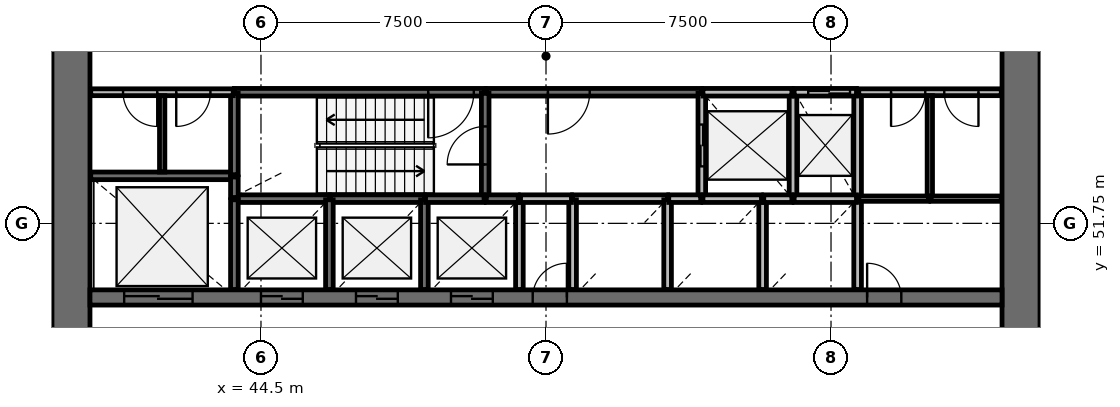
"""IFC4 building model, lengths in metres.
Left out: names, types, materials, properties, quantities, classifications, styles, units other than length and angle.
Written with IfcOpenShell. Run it as: python <this file> out.ifc"""

import sys

from ifc_helpers import new_model, si_unit, direction, frame, frame_2d, origin, place, context, subcontext, project, spatial, rectangle, extrude, source, transform, mapped, element, fill, save


model = new_model("IFC4")
c1 = context("Model", 3, precision=1e-05, world=origin(), true_north=direction((0.0, 1.0)))
c2 = subcontext(c1, "Body", "Model", "MODEL_VIEW")
j1 = project(units=[si_unit("LENGTHUNIT", "METRE"), si_unit("PLANEANGLEUNIT", "RADIAN")], contexts=[c1])
p1 = place(None, origin())
s1 = spatial("IfcSite", under=j1, at=p1, CompositionType="ELEMENT")
p2 = place(p1, origin())
s2 = spatial("IfcBuilding", under=s1, at=p2, CompositionType="ELEMENT")
p3 = place(p2, frame((0.0, 0.0, 49.0)))
s3 = spatial("IfcBuildingStorey", under=s2, at=p3, CompositionType="ELEMENT", Elevation=49.0)
p4 = place(p3, frame((64.5, 38.0, 0.0), z_axis=(0.0, 0.0, 1.0), x_axis=(0.0, 1.0, 0.0)))
e1 = element("IfcWall", 1, at=p4, inside=s3, PredefinedType="SHEAR", context=c2, shape_type="SweptSolid", body=[
    extrude(rectangle(XDim=20.0, YDim=1.0, at=frame_2d((10.0, 0.0))), origin(), (0.0, 0.0, 1.0), 4.4),
])
p5 = place(p4, frame((9.1, 0.0, 0.0)))
e2 = element("IfcOpeningElement", 2, at=p5, cuts=e1, PredefinedType="OPENING", context=c2, shape_type="SweptSolid", body=[
    extrude(rectangle(XDim=1.8, YDim=2.1, at=frame_2d((0.9, 1.05))), frame((0.0, 0.51, 0.0), z_axis=(0.0, -1.0, 0.0), x_axis=(1.0, 0.0, 0.0)), (0.0, 0.0, 1.0), 1.02),
])
p6 = place(p3, frame((39.5, 58.0, 0.0), z_axis=(0.0, 0.0, 1.0), x_axis=(0.0, -1.0, 0.0)))
e3 = element("IfcWall", 3, at=p6, inside=s3, PredefinedType="SHEAR", context=c2, shape_type="SweptSolid", body=[
    extrude(rectangle(XDim=20.0, YDim=1.0, at=frame_2d((10.0, 0.0))), origin(), (0.0, 0.0, 1.0), 4.4),
])
p7 = place(p6, frame((9.1, 0.0, 0.0)))
e4 = element("IfcOpeningElement", 4, at=p7, cuts=e3, PredefinedType="OPENING", context=c2, shape_type="SweptSolid", body=[
    extrude(rectangle(XDim=1.8, YDim=2.1, at=frame_2d((0.9, 1.05))), frame((0.0, 0.51, 0.0), z_axis=(0.0, -1.0, 0.0), x_axis=(1.0, 0.0, 0.0)), (0.0, 0.0, 1.0), 1.02),
])
p8 = place(p3, frame((40.0, 49.8, 0.0), z_axis=(0.0, 0.0, 1.0), x_axis=(1.0, 0.0, 0.0)))
e5 = element("IfcWall", 5, at=p8, inside=s3, PredefinedType="SHEAR", context=c2, shape_type="SweptSolid", body=[
    extrude(rectangle(XDim=24.0, YDim=0.4, at=frame_2d((12.0, 0.0))), origin(), (0.0, 0.0, 1.0), 4.4),
])
p9 = place(p8, frame((4.5, 0.0, 0.0)))
e6 = element("IfcOpeningElement", 6, at=p9, cuts=e5, PredefinedType="OPENING", context=c2, shape_type="SweptSolid", body=[
    extrude(rectangle(XDim=1.1, YDim=2.1, at=frame_2d((0.55, 1.05))), frame((0.0, 0.21, 0.0), z_axis=(0.0, -1.0, 0.0), x_axis=(1.0, 0.0, 0.0)), (0.0, 0.0, 1.0), 0.42),
])
p10 = place(p8, frame((7.0, 0.0, 0.0)))
e7 = element("IfcOpeningElement", 7, at=p10, cuts=e5, PredefinedType="OPENING", context=c2, shape_type="SweptSolid", body=[
    extrude(rectangle(XDim=1.1, YDim=2.1, at=frame_2d((0.55, 1.05))), frame((0.0, 0.21, 0.0), z_axis=(0.0, -1.0, 0.0), x_axis=(1.0, 0.0, 0.0)), (0.0, 0.0, 1.0), 0.42),
])
p11 = place(p8, frame((9.5, 0.0, 0.0)))
e8 = element("IfcOpeningElement", 8, at=p11, cuts=e5, PredefinedType="OPENING", context=c2, shape_type="SweptSolid", body=[
    extrude(rectangle(XDim=1.1, YDim=2.1, at=frame_2d((0.55, 1.05))), frame((0.0, 0.21, 0.0), z_axis=(0.0, -1.0, 0.0), x_axis=(1.0, 0.0, 0.0)), (0.0, 0.0, 1.0), 0.42),
])
p12 = place(p8, frame((0.9, 0.0, 0.0)))
e9 = element("IfcOpeningElement", 9, at=p12, cuts=e5, PredefinedType="OPENING", context=c2, shape_type="SweptSolid", body=[
    extrude(rectangle(XDim=1.8, YDim=2.4, at=frame_2d((0.9, 1.2))), frame((0.0, 0.21, 0.0), z_axis=(0.0, -1.0, 0.0), x_axis=(1.0, 0.0, 0.0)), (0.0, 0.0, 1.0), 0.42),
])
p13 = place(p8, frame((20.45, 0.0, 0.0)))
e10 = element("IfcOpeningElement", 10, at=p13, cuts=e5, PredefinedType="OPENING", context=c2, shape_type="SweptSolid", body=[
    extrude(rectangle(XDim=0.9, YDim=2.1, at=frame_2d((0.45, 1.05))), frame((0.0, 0.21, 0.0), z_axis=(0.0, -1.0, 0.0), x_axis=(1.0, 0.0, 0.0)), (0.0, 0.0, 1.0), 0.42),
])
p14 = place(p8, frame((11.65, 0.0, 0.0)))
e11 = element("IfcOpeningElement", 11, at=p14, cuts=e5, PredefinedType="OPENING", context=c2, shape_type="SweptSolid", body=[
    extrude(rectangle(XDim=0.9, YDim=2.1, at=frame_2d((0.45, 1.05))), frame((0.0, 0.21, 0.0), z_axis=(0.0, -1.0, 0.0), x_axis=(1.0, 0.0, 0.0)), (0.0, 0.0, 1.0), 0.42),
])
p15 = place(p3, frame((50.4, 55.2, 0.0), z_axis=(0.0, 0.0, 1.0), x_axis=(-1.0, 0.0, 0.0)))
e12 = element("IfcWall", 12, at=p15, inside=s3, PredefinedType="SOLIDWALL", context=c2, shape_type="SweptSolid", body=[
    extrude(rectangle(XDim=6.6, YDim=0.2, at=frame_2d((3.3, 0.0))), origin(), (0.0, 0.0, 1.0), 3.95),
])
p16 = place(p15, frame((0.3, 0.0, 0.0)))
e13 = element("IfcOpeningElement", 13, at=p16, cuts=e12, PredefinedType="OPENING", context=c2, shape_type="SweptSolid", body=[
    extrude(rectangle(XDim=1.2, YDim=2.1, at=frame_2d((0.6, 1.05))), frame((0.0, 0.11, 0.0), z_axis=(0.0, -1.0, 0.0), x_axis=(1.0, 0.0, 0.0)), (0.0, 0.0, 1.0), 0.22),
])
p17 = place(p3, frame((56.1, 55.2, 0.0), z_axis=(0.0, 0.0, 1.0), x_axis=(-1.0, 0.0, 0.0)))
e14 = element("IfcWall", 14, at=p17, inside=s3, PredefinedType="SOLIDWALL", context=c2, shape_type="SweptSolid", body=[
    extrude(rectangle(XDim=5.67, YDim=0.2, at=frame_2d((2.835, 0.0))), origin(), (0.0, 0.0, 1.0), 3.95),
])
p18 = place(p17, frame((2.95, 0.0, 0.0)))
e15 = element("IfcOpeningElement", 15, at=p18, cuts=e14, PredefinedType="OPENING", context=c2, shape_type="SweptSolid", body=[
    extrude(rectangle(XDim=1.1, YDim=2.1, at=frame_2d((0.55, 1.05))), frame((0.0, 0.11, 0.0), z_axis=(0.0, -1.0, 0.0), x_axis=(1.0, 0.0, 0.0)), (0.0, 0.0, 1.0), 0.22),
])
p19 = place(p3, frame((43.8, 53.0, 0.0), z_axis=(0.0, 0.0, 1.0), x_axis=(-1.0, 0.0, 0.0)))
e16 = element("IfcWall", 16, at=p19, inside=s3, PredefinedType="SOLIDWALL", context=c2, shape_type="SweptSolid", body=[
    extrude(rectangle(XDim=3.78, YDim=0.2, at=frame_2d((1.89, 0.0))), origin(), (0.0, 0.0, 1.0), 3.95),
])
p20 = place(p3, frame((50.4, 52.4, 0.0), z_axis=(0.0, 0.0, 1.0), x_axis=(0.0, 1.0, 0.0)))
e17 = element("IfcWall", 17, at=p20, inside=s3, PredefinedType="SOLIDWALL", context=c2, shape_type="SweptSolid", body=[
    extrude(rectangle(XDim=2.77, YDim=0.2, at=frame_2d((1.385, 0.0))), origin(), (0.0, 0.0, 1.0), 3.95),
])
p21 = place(p20, frame((0.9, 0.0, 0.0)))
e18 = element("IfcOpeningElement", 18, at=p21, cuts=e17, PredefinedType="OPENING", context=c2, shape_type="SweptSolid", body=[
    extrude(rectangle(XDim=1.0, YDim=2.1, at=frame_2d((0.5, 1.05))), frame((0.0, 0.11, 0.0), z_axis=(0.0, -1.0, 0.0), x_axis=(1.0, 0.0, 0.0)), (0.0, 0.0, 1.0), 0.22),
])
p22 = place(p3, frame((56.1, 55.17, 0.0), z_axis=(0.0, 0.0, 1.0), x_axis=(0.0, -1.0, 0.0)))
e19 = element("IfcWall", 19, at=p22, inside=s3, PredefinedType="SOLIDWALL", context=c2, shape_type="SweptSolid", body=[
    extrude(rectangle(XDim=2.77, YDim=0.2, at=frame_2d((1.385, 0.0))), origin(), (0.0, 0.0, 1.0), 3.95),
])
p23 = place(p22, frame((0.82, 0.0, 0.0)))
e20 = element("IfcOpeningElement", 20, at=p23, cuts=e19, PredefinedType="OPENING", context=c2, shape_type="SweptSolid", body=[
    extrude(rectangle(XDim=1.1, YDim=2.1, at=frame_2d((0.55, 1.05))), frame((0.0, 0.11, 0.0), z_axis=(0.0, -1.0, 0.0), x_axis=(1.0, 0.0, 0.0)), (0.0, 0.0, 1.0), 0.22),
])
for number, where, z_axis, x_axis in (
    (21, (58.5, 52.4, 0.0), (0.0, 0.0, 1.0), (0.0, 1.0, 0.0)),
    (22, (60.2, 52.4, 0.0), (0.0, 0.0, 1.0), (0.0, 1.0, 0.0)),
):
    element("IfcWall", number, at=place(p3, frame(where, z_axis=z_axis, x_axis=x_axis)), inside=s3, PredefinedType="SOLIDWALL", context=c2, shape_type="SweptSolid", body=[
        extrude(rectangle(XDim=2.8, YDim=0.2, at=frame_2d((1.4, 0.0))), origin(), (0.0, 0.0, 1.0), 3.95),
    ])
p24 = place(p3, frame((46.3, 52.4, 0.0), z_axis=(0.0, 0.0, 1.0), x_axis=(-1.0, 0.0, 0.0)))
e23 = element("IfcWall", 23, at=p24, inside=s3, PredefinedType="SOLIDWALL", context=c2, shape_type="SweptSolid", body=[
    extrude(rectangle(XDim=2.5, YDim=0.2, at=frame_2d((1.25, 0.0))), origin(), (0.0, 0.0, 1.0), 3.95),
])
p25 = place(p3, frame((48.8, 52.4, 0.0), z_axis=(0.0, 0.0, 1.0), x_axis=(-1.0, 0.0, 0.0)))
e24 = element("IfcWall", 24, at=p25, inside=s3, PredefinedType="SOLIDWALL", context=c2, shape_type="SweptSolid", body=[
    extrude(rectangle(XDim=2.47, YDim=0.2, at=frame_2d((1.235, 0.0))), origin(), (0.0, 0.0, 1.0), 3.95),
])
p26 = place(p3, frame((55.2, 52.4, 0.0), z_axis=(0.0, 0.0, 1.0), x_axis=(-1.0, 0.0, 0.0)))
e25 = element("IfcWall", 25, at=p26, inside=s3, PredefinedType="SOLIDWALL", context=c2, shape_type="SweptSolid", body=[
    extrude(rectangle(XDim=2.5, YDim=0.2, at=frame_2d((1.25, 0.0))), origin(), (0.0, 0.0, 1.0), 3.95),
])
p27 = place(p3, frame((58.47, 55.2, 0.0), z_axis=(0.0, 0.0, 1.0), x_axis=(-1.0, 0.0, 0.0)))
e26 = element("IfcWall", 26, at=p27, inside=s3, PredefinedType="SOLIDWALL", context=c2, shape_type="SweptSolid", body=[
    extrude(rectangle(XDim=2.34, YDim=0.2, at=frame_2d((1.17, 0.0))), origin(), (0.0, 0.0, 1.0), 3.95),
])
for number, where, z_axis, x_axis in (
    (27, (43.8, 52.37, 0.0), (0.0, 0.0, 1.0), (0.0, -1.0, 0.0)),
    (28, (46.3, 50.01, 0.0), (0.0, 0.0, 1.0), (0.0, 1.0, 0.0)),
    (29, (48.8, 50.01, 0.0), (0.0, 0.0, 1.0), (0.0, 1.0, 0.0)),
):
    element("IfcWall", number, at=place(p3, frame(where, z_axis=z_axis, x_axis=x_axis)), inside=s3, PredefinedType="SOLIDWALL", context=c2, shape_type="SweptSolid", body=[
        extrude(rectangle(XDim=2.36, YDim=0.2, at=frame_2d((1.18, 0.0))), origin(), (0.0, 0.0, 1.0), 3.95),
    ])
p28 = place(p3, frame((51.3, 50.01, 0.0), z_axis=(0.0, 0.0, 1.0), x_axis=(0.0, 1.0, 0.0)))
e30 = element("IfcWall", 30, at=p28, inside=s3, PredefinedType="SOLIDWALL", context=c2, shape_type="SweptSolid", body=[
    extrude(rectangle(XDim=2.39, YDim=0.2, at=frame_2d((1.195, 0.0))), origin(), (0.0, 0.0, 1.0), 3.95),
])
for number, where, z_axis, x_axis in (
    (31, (52.7, 52.37, 0.0), (0.0, 0.0, 1.0), (0.0, -1.0, 0.0)),
    (32, (55.2, 50.01, 0.0), (0.0, 0.0, 1.0), (0.0, 1.0, 0.0)),
):
    element("IfcWall", number, at=place(p3, frame(where, z_axis=z_axis, x_axis=x_axis)), inside=s3, PredefinedType="SOLIDWALL", context=c2, shape_type="SweptSolid", body=[
        extrude(rectangle(XDim=2.36, YDim=0.2, at=frame_2d((1.18, 0.0))), origin(), (0.0, 0.0, 1.0), 3.95),
    ])
p29 = place(p3, frame((57.7, 50.01, 0.0), z_axis=(0.0, 0.0, 1.0), x_axis=(0.0, 1.0, 0.0)))
e33 = element("IfcWall", 33, at=p29, inside=s3, PredefinedType="SOLIDWALL", context=c2, shape_type="SweptSolid", body=[
    extrude(rectangle(XDim=2.39, YDim=0.2, at=frame_2d((1.195, 0.0))), origin(), (0.0, 0.0, 1.0), 3.95),
])
p30 = place(p3, frame((60.2, 50.01, 0.0), z_axis=(0.0, 0.0, 1.0), x_axis=(0.0, 1.0, 0.0)))
e34 = element("IfcWall", 34, at=p30, inside=s3, PredefinedType="SOLIDWALL", context=c2, shape_type="SweptSolid", body=[
    extrude(rectangle(XDim=2.36, YDim=0.2, at=frame_2d((1.18, 0.0))), origin(), (0.0, 0.0, 1.0), 3.95),
])
p31 = place(p3, frame((43.8, 55.17, 0.0), z_axis=(0.0, 0.0, 1.0), x_axis=(0.0, -1.0, 0.0)))
e35 = element("IfcWall", 35, at=p31, inside=s3, PredefinedType="SOLIDWALL", context=c2, shape_type="SweptSolid", body=[
    extrude(rectangle(XDim=2.14, YDim=0.2, at=frame_2d((1.07, 0.0))), origin(), (0.0, 0.0, 1.0), 3.95),
])
p32 = place(p3, frame((60.17, 52.4, 0.0), z_axis=(0.0, 0.0, 1.0), x_axis=(-1.0, 0.0, 0.0)))
e36 = element("IfcWall", 36, at=p32, inside=s3, PredefinedType="SOLIDWALL", context=c2, shape_type="SweptSolid", body=[
    extrude(rectangle(XDim=1.64, YDim=0.2, at=frame_2d((0.82, 0.0))), origin(), (0.0, 0.0, 1.0), 3.95),
])
p33 = place(p3, frame((60.17, 55.2, 0.0), z_axis=(0.0, 0.0, 1.0), x_axis=(-1.0, 0.0, 0.0)))
e37 = element("IfcWall", 37, at=p33, inside=s3, PredefinedType="SOLIDWALL", context=c2, shape_type="SweptSolid", body=[
    extrude(rectangle(XDim=1.64, YDim=0.2, at=frame_2d((0.82, 0.0))), origin(), (0.0, 0.0, 1.0), 3.95),
])
p34 = place(p33, frame((0.17, 0.0, 0.0)))
e38 = element("IfcOpeningElement", 38, at=p34, cuts=e37, PredefinedType="OPENING", context=c2, shape_type="SweptSolid", body=[
    extrude(rectangle(XDim=1.1, YDim=2.1, at=frame_2d((0.55, 1.05))), frame((0.0, 0.11, 0.0), z_axis=(0.0, -1.0, 0.0), x_axis=(1.0, 0.0, 0.0)), (0.0, 0.0, 1.0), 0.22),
])
for number, where, z_axis, x_axis in (
    (39, (50.37, 52.4, 0.0), (0.0, 0.0, 1.0), (-1.0, 0.0, 0.0)),
    (40, (57.67, 52.4, 0.0), (0.0, 0.0, 1.0), (-1.0, 0.0, 0.0)),
):
    element("IfcWall", number, at=place(p3, frame(where, z_axis=z_axis, x_axis=x_axis)), inside=s3, PredefinedType="SOLIDWALL", context=c2, shape_type="SweptSolid", body=[
        extrude(rectangle(XDim=1.54, YDim=0.2, at=frame_2d((0.77, 0.0))), origin(), (0.0, 0.0, 1.0), 3.95),
    ])
p35 = place(p3, frame((51.33, 52.4, 0.0), z_axis=(0.0, 0.0, 1.0), x_axis=(1.0, 0.0, 0.0)))
e41 = element("IfcWall", 41, at=p35, inside=s3, PredefinedType="SOLIDWALL", context=c2, shape_type="SweptSolid", body=[
    extrude(rectangle(XDim=1.34, YDim=0.2, at=frame_2d((0.67, 0.0))), origin(), (0.0, 0.0, 1.0), 3.95),
])
for number, where, z_axis, x_axis in (
    (42, (51.27, 52.4, 0.0), (0.0, 0.0, 1.0), (-1.0, 0.0, 0.0)),
    (43, (56.07, 52.4, 0.0), (0.0, 0.0, 1.0), (-1.0, 0.0, 0.0)),
):
    element("IfcWall", number, at=place(p3, frame(where, z_axis=z_axis, x_axis=x_axis)), inside=s3, PredefinedType="SOLIDWALL", context=c2, shape_type="SweptSolid", body=[
        extrude(rectangle(XDim=0.84, YDim=0.2, at=frame_2d((0.42, 0.0))), origin(), (0.0, 0.0, 1.0), 3.95),
    ])
p36 = place(p3, frame((58.47, 52.4, 0.0), z_axis=(0.0, 0.0, 1.0), x_axis=(-1.0, 0.0, 0.0)))
e44 = element("IfcWall", 44, at=p36, inside=s3, PredefinedType="SOLIDWALL", context=c2, shape_type="SweptSolid", body=[
    extrude(rectangle(XDim=0.74, YDim=0.2, at=frame_2d((0.37, 0.0))), origin(), (0.0, 0.0, 1.0), 3.95),
])
p37 = place(p3, frame((43.8, 52.43, 0.0), z_axis=(0.0, 0.0, 1.0), x_axis=(0.0, 1.0, 0.0)))
e45 = element("IfcWall", 45, at=p37, inside=s3, PredefinedType="SOLIDWALL", context=c2, shape_type="SweptSolid", body=[
    extrude(rectangle(XDim=0.54, YDim=0.2, at=frame_2d((0.27, 0.0))), origin(), (0.0, 0.0, 1.0), 3.95),
])
p38 = place(p3, frame((43.77, 55.2, 0.0), z_axis=(0.0, 0.0, 1.0), x_axis=(-1.0, 0.0, 0.0)))
e46 = element("IfcWall", 46, at=p38, inside=s3, PredefinedType="PARTITIONING", context=c2, shape_type="SweptSolid", body=[
    extrude(rectangle(XDim=3.75, YDim=0.18, at=frame_2d((1.875, 0.0))), origin(), (0.0, 0.0, 1.0), 3.95),
])
p39 = place(p38, frame((2.0, 0.0, 0.0)))
e47 = element("IfcOpeningElement", 47, at=p39, cuts=e46, PredefinedType="OPENING", context=c2, shape_type="SweptSolid", body=[
    extrude(rectangle(XDim=0.9, YDim=2.1, at=frame_2d((0.45, 1.05))), frame((0.0, 0.1, 0.0), z_axis=(0.0, -1.0, 0.0), x_axis=(1.0, 0.0, 0.0)), (0.0, 0.0, 1.0), 0.2),
])
p40 = place(p38, frame((0.6, 0.0, 0.0)))
e48 = element("IfcOpeningElement", 48, at=p40, cuts=e46, PredefinedType="OPENING", context=c2, shape_type="SweptSolid", body=[
    extrude(rectangle(XDim=0.9, YDim=2.1, at=frame_2d((0.45, 1.05))), frame((0.0, 0.1, 0.0), z_axis=(0.0, -1.0, 0.0), x_axis=(1.0, 0.0, 0.0)), (0.0, 0.0, 1.0), 0.2),
])
p41 = place(p3, frame((63.98, 55.2, 0.0), z_axis=(0.0, 0.0, 1.0), x_axis=(-1.0, 0.0, 0.0)))
e49 = element("IfcWall", 49, at=p41, inside=s3, PredefinedType="PARTITIONING", context=c2, shape_type="SweptSolid", body=[
    extrude(rectangle(XDim=3.75, YDim=0.18, at=frame_2d((1.875, 0.0))), origin(), (0.0, 0.0, 1.0), 3.95),
])
p42 = place(p41, frame((2.0, 0.0, 0.0)))
e50 = element("IfcOpeningElement", 50, at=p42, cuts=e49, PredefinedType="OPENING", context=c2, shape_type="SweptSolid", body=[
    extrude(rectangle(XDim=0.9, YDim=2.1, at=frame_2d((0.45, 1.05))), frame((0.0, 0.1, 0.0), z_axis=(0.0, -1.0, 0.0), x_axis=(1.0, 0.0, 0.0)), (0.0, 0.0, 1.0), 0.2),
])
p43 = place(p41, frame((0.6, 0.0, 0.0)))
e51 = element("IfcOpeningElement", 51, at=p43, cuts=e49, PredefinedType="OPENING", context=c2, shape_type="SweptSolid", body=[
    extrude(rectangle(XDim=0.9, YDim=2.1, at=frame_2d((0.45, 1.05))), frame((0.0, 0.1, 0.0), z_axis=(0.0, -1.0, 0.0), x_axis=(1.0, 0.0, 0.0)), (0.0, 0.0, 1.0), 0.2),
])
p44 = place(p3, frame((62.1, 52.4, 0.0), z_axis=(0.0, 0.0, 1.0), x_axis=(0.0, 1.0, 0.0)))
e52 = element("IfcWall", 52, at=p44, inside=s3, PredefinedType="PARTITIONING", context=c2, shape_type="SweptSolid", body=[
    extrude(rectangle(XDim=2.71, YDim=0.14, at=frame_2d((1.355, 0.0))), origin(), (0.0, 0.0, 1.0), 3.05),
])
p45 = place(p3, frame((41.9, 53.1, 0.0), z_axis=(0.0, 0.0, 1.0), x_axis=(0.0, 1.0, 0.0)))
e53 = element("IfcWall", 53, at=p45, inside=s3, PredefinedType="PARTITIONING", context=c2, shape_type="SweptSolid", body=[
    extrude(rectangle(XDim=2.01, YDim=0.14, at=frame_2d((1.005, 0.0))), origin(), (0.0, 0.0, 1.0), 3.05),
])
p46 = place(p3, frame((62.07, 52.4, 0.0), z_axis=(0.0, 0.0, 1.0), x_axis=(-1.0, 0.0, 0.0)))
e54 = element("IfcWall", 54, at=p46, inside=s3, PredefinedType="PARTITIONING", context=c2, shape_type="SweptSolid", body=[
    extrude(rectangle(XDim=1.84, YDim=0.14, at=frame_2d((0.92, 0.0))), origin(), (0.0, 0.0, 1.0), 3.05),
])
p47 = place(p3, frame((63.98, 52.4, 0.0), z_axis=(0.0, 0.0, 1.0), x_axis=(-1.0, 0.0, 0.0)))
e55 = element("IfcWall", 55, at=p47, inside=s3, PredefinedType="PARTITIONING", context=c2, shape_type="SweptSolid", body=[
    extrude(rectangle(XDim=1.85, YDim=0.14, at=frame_2d((0.925, 0.0))), origin(), (0.0, 0.0, 1.0), 3.05),
])
m1 = source(origin(), c2, "Body", "SweptSolid", [
    extrude(rectangle(XDim=1.1, YDim=2.1, at=frame_2d((0.55, 1.05))), frame((0.0, 0.025, 0.0), z_axis=(0.0, -1.0, 0.0), x_axis=(1.0, 0.0, 0.0)), (0.0, 0.0, 1.0), 0.05),
])
p48 = place(p9, origin())
e56 = element("IfcDoor", 56, at=p48, inside=s3, OperationType="DOUBLE_DOOR_SLIDING", PredefinedType="USERDEFINED", context=c2, shape_type="MappedRepresentation", body=[
    mapped(m1, transform((0.0, 0.0, 0.0), scale=1.0)),
])
fill(e6, e56)
p49 = place(p10, origin())
e57 = element("IfcDoor", 57, at=p49, inside=s3, OperationType="DOUBLE_DOOR_SLIDING", PredefinedType="USERDEFINED", context=c2, shape_type="MappedRepresentation", body=[
    mapped(m1, transform((0.0, 0.0, 0.0), scale=1.0)),
])
fill(e7, e57)
p50 = place(p11, origin())
e58 = element("IfcDoor", 58, at=p50, inside=s3, OperationType="DOUBLE_DOOR_SLIDING", PredefinedType="USERDEFINED", context=c2, shape_type="MappedRepresentation", body=[
    mapped(m1, transform((0.0, 0.0, 0.0), scale=1.0)),
])
fill(e8, e58)
p51 = place(p23, origin())
e59 = element("IfcDoor", 59, at=p51, inside=s3, OperationType="DOUBLE_DOOR_SLIDING", PredefinedType="USERDEFINED", context=c2, shape_type="MappedRepresentation", body=[
    mapped(m1, transform((0.0, 0.0, 0.0), scale=1.0)),
])
fill(e20, e59)
p52 = place(p34, origin())
e60 = element("IfcDoor", 60, at=p52, inside=s3, OperationType="DOUBLE_DOOR_SLIDING", PredefinedType="USERDEFINED", context=c2, shape_type="MappedRepresentation", body=[
    mapped(m1, transform((0.0, 0.0, 0.0), scale=1.0)),
])
fill(e38, e60)
m2 = source(origin(), c2, "Body", "SweptSolid", [
    extrude(rectangle(XDim=1.8, YDim=2.4, at=frame_2d((0.9, 1.2))), frame((0.0, 0.025, 0.0), z_axis=(0.0, -1.0, 0.0), x_axis=(1.0, 0.0, 0.0)), (0.0, 0.0, 1.0), 0.05),
])
p53 = place(p12, origin())
e61 = element("IfcDoor", 61, at=p53, inside=s3, OperationType="DOUBLE_DOOR_SLIDING", PredefinedType="USERDEFINED", context=c2, shape_type="MappedRepresentation", body=[
    mapped(m2, transform((0.0, 0.0, 0.0), scale=1.0)),
])
fill(e9, e61)
m3 = source(origin(), c2, "Body", "SweptSolid", [
    extrude(rectangle(XDim=1.2, YDim=2.1, at=frame_2d((0.6, 1.05))), frame((0.0, 0.025, 0.0), z_axis=(0.0, -1.0, 0.0), x_axis=(1.0, 0.0, 0.0)), (0.0, 0.0, 1.0), 0.05),
])
p54 = place(p16, origin())
e62 = element("IfcDoor", 62, at=p54, inside=s3, OperationType="SINGLE_SWING_RIGHT", PredefinedType="DOOR", context=c2, shape_type="MappedRepresentation", body=[
    mapped(m3, transform((0.0, 0.0, 0.0), scale=1.0)),
])
fill(e13, e62)
m4 = source(origin(), c2, "Body", "SweptSolid", [
    extrude(rectangle(XDim=1.0, YDim=2.1, at=frame_2d((0.5, 1.05))), frame((0.0, 0.025, 0.0), z_axis=(0.0, -1.0, 0.0), x_axis=(1.0, 0.0, 0.0)), (0.0, 0.0, 1.0), 0.05),
])
p55 = place(p21, origin())
e63 = element("IfcDoor", 63, at=p55, inside=s3, OperationType="SINGLE_SWING_LEFT", PredefinedType="DOOR", context=c2, shape_type="MappedRepresentation", body=[
    mapped(m4, transform((0.0, 0.0, 0.0), scale=1.0)),
])
fill(e18, e63)
m5 = source(origin(), c2, "Body", "SweptSolid", [
    extrude(rectangle(XDim=1.1, YDim=2.1, at=frame_2d((0.55, 1.05))), frame((0.0, 0.025, 0.0), z_axis=(0.0, -1.0, 0.0), x_axis=(1.0, 0.0, 0.0)), (0.0, 0.0, 1.0), 0.05),
])
p56 = place(p18, origin())
e64 = element("IfcDoor", 64, at=p56, inside=s3, OperationType="SINGLE_SWING_RIGHT", PredefinedType="DOOR", context=c2, shape_type="MappedRepresentation", body=[
    mapped(m5, transform((0.0, 0.0, 0.0), scale=1.0)),
])
fill(e15, e64)
m6 = source(origin(), c2, "Body", "SweptSolid", [
    extrude(rectangle(XDim=0.9, YDim=2.1, at=frame_2d((0.45, 1.05))), frame((0.0, 0.025, 0.0), z_axis=(0.0, -1.0, 0.0), x_axis=(1.0, 0.0, 0.0)), (0.0, 0.0, 1.0), 0.05),
])
p57 = place(p39, origin())
e65 = element("IfcDoor", 65, at=p57, inside=s3, OperationType="SINGLE_SWING_LEFT", PredefinedType="DOOR", context=c2, shape_type="MappedRepresentation", body=[
    mapped(m6, transform((0.0, 0.0, 0.0), scale=1.0)),
])
fill(e47, e65)
p58 = place(p40, origin())
e66 = element("IfcDoor", 66, at=p58, inside=s3, OperationType="SINGLE_SWING_RIGHT", PredefinedType="DOOR", context=c2, shape_type="MappedRepresentation", body=[
    mapped(m6, transform((0.0, 0.0, 0.0), scale=1.0)),
])
fill(e48, e66)
p59 = place(p13, origin())
e67 = element("IfcDoor", 67, at=p59, inside=s3, OperationType="SINGLE_SWING_LEFT", PredefinedType="DOOR", context=c2, shape_type="MappedRepresentation", body=[
    mapped(m6, transform((0.0, 0.0, 0.0), scale=1.0)),
])
fill(e10, e67)
p60 = place(p42, origin())
e68 = element("IfcDoor", 68, at=p60, inside=s3, OperationType="SINGLE_SWING_RIGHT", PredefinedType="DOOR", context=c2, shape_type="MappedRepresentation", body=[
    mapped(m6, transform((0.0, 0.0, 0.0), scale=1.0)),
])
fill(e50, e68)
p61 = place(p43, origin())
e69 = element("IfcDoor", 69, at=p61, inside=s3, OperationType="SINGLE_SWING_LEFT", PredefinedType="DOOR", context=c2, shape_type="MappedRepresentation", body=[
    mapped(m6, transform((0.0, 0.0, 0.0), scale=1.0)),
])
fill(e51, e69)
p62 = place(p14, origin())
e70 = element("IfcDoor", 70, at=p62, inside=s3, OperationType="SINGLE_SWING_RIGHT", PredefinedType="DOOR", context=c2, shape_type="MappedRepresentation", body=[
    mapped(m6, transform((0.0, 0.0, 0.0), scale=1.0)),
])
fill(e11, e70)
save(model, sys.argv[1])
